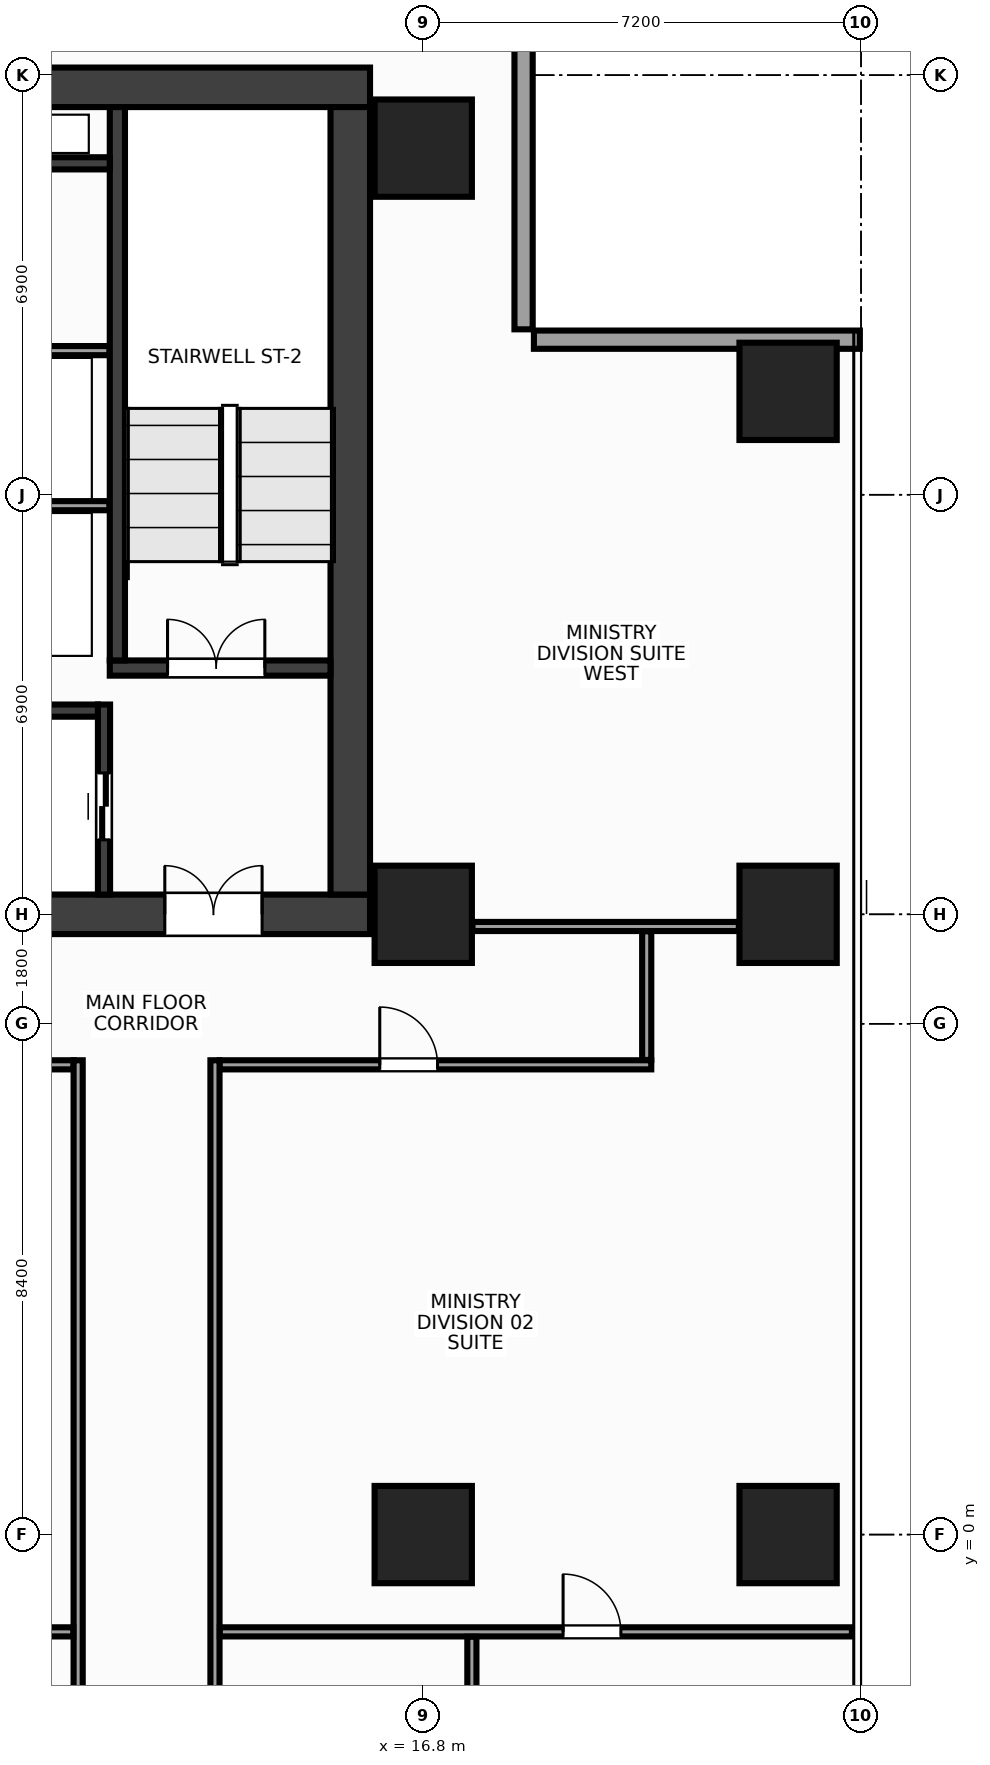
"""IFC4 building model, lengths in metres.
Left out: names, types, materials, properties, quantities, classifications, styles, units other than length and angle.
Written with IfcOpenShell. Run it as: python <this file> out.ifc"""

import sys

from ifc_helpers import new_model, si_unit, direction, frame, frame_2d, origin, origin_2d, place, context, subcontext, project, spatial, rectangle, extrude, source, transform, mapped, element, fill, save


model = new_model("IFC4")
c1 = context("Model", 3, precision=1e-05, world=origin(), true_north=direction((0.0, 1.0)))
c2 = subcontext(c1, "Body", "Model", "MODEL_VIEW")
j1 = project(units=[si_unit("LENGTHUNIT", "METRE"), si_unit("PLANEANGLEUNIT", "RADIAN")], contexts=[c1])
p1 = place(None, origin())
s1 = spatial("IfcSite", under=j1, at=p1, CompositionType="ELEMENT")
p2 = place(p1, origin())
s2 = spatial("IfcBuilding", under=s1, at=p2, CompositionType="ELEMENT")
p3 = place(p2, frame((0.0, 0.0, 153.2)))
s3 = spatial("IfcBuildingStorey", under=s2, at=p3, CompositionType="ELEMENT", Elevation=153.2)
m1 = source(origin(), c2, "Body", "SweptSolid", [
    extrude(rectangle(XDim=31.85, YDim=0.65, at=frame_2d((15.925, 0.0))), origin(), (0.0, 0.0, 1.0), 3.6),
])
p4 = place(p3, frame((-15.925, 23.8, 0.0), z_axis=(0.0, 0.0, 1.0), x_axis=(1.0, 0.0, 0.0)))
e1 = element("IfcWall", 1, at=p4, inside=s3, PredefinedType="SHEAR", context=c2, shape_type="MappedRepresentation", body=[
    mapped(m1, transform((0.0, 0.0, 0.0), x_axis=(1.0, 0.0, 0.0), y_axis=(0.0, 1.0, 0.0), z_axis=(0.0, 0.0, 1.0), scale=1.0)),
])
p5 = place(p3, frame((-15.925, 10.2, 0.0), z_axis=(0.0, 0.0, 1.0), x_axis=(1.0, 0.0, 0.0)))
e2 = element("IfcWall", 2, at=p5, inside=s3, PredefinedType="SHEAR", context=c2, shape_type="MappedRepresentation", body=[
    mapped(m1, transform((0.0, 0.0, 0.0), x_axis=(1.0, 0.0, 0.0), y_axis=(0.0, 1.0, 0.0), z_axis=(0.0, 0.0, 1.0), scale=1.0)),
])
p6 = place(p5, frame((1.775, 0.0, 0.0)))
e3 = element("IfcOpeningElement", 3, at=p6, cuts=e2, PredefinedType="OPENING", context=c2, shape_type="SweptSolid", body=[
    extrude(rectangle(XDim=1.6, YDim=2.15, at=frame_2d((0.8, 1.075))), frame((0.0, 0.337, 0.0), z_axis=(0.0, -1.0, 0.0), x_axis=(1.0, 0.0, 0.0)), (0.0, 0.0, 1.0), 0.674),
])
p7 = place(p5, frame((28.475, 0.0, 0.0)))
e4 = element("IfcOpeningElement", 4, at=p7, cuts=e2, PredefinedType="OPENING", context=c2, shape_type="SweptSolid", body=[
    extrude(rectangle(XDim=1.6, YDim=2.15, at=frame_2d((0.8, 1.075))), frame((0.0, 0.337, 0.0), z_axis=(0.0, -1.0, 0.0), x_axis=(1.0, 0.0, 0.0)), (0.0, 0.0, 1.0), 0.674),
])
p8 = place(p5, frame((15.175, 0.0, 0.0)))
e5 = element("IfcOpeningElement", 5, at=p8, cuts=e2, PredefinedType="OPENING", context=c2, shape_type="SweptSolid", body=[
    extrude(rectangle(XDim=1.5, YDim=2.2, at=frame_2d((0.75, 1.1))), frame((0.0, 0.337, 0.0), z_axis=(0.0, -1.0, 0.0), x_axis=(1.0, 0.0, 0.0)), (0.0, 0.0, 1.0), 0.674),
])
m2 = source(origin(), c2, "Body", "SweptSolid", [
    extrude(rectangle(XDim=12.95, YDim=0.65, at=frame_2d((6.475, 0.0))), origin(), (0.0, 0.0, 1.0), 3.6),
])
p9 = place(p3, frame((15.6, 10.525, 0.0), z_axis=(0.0, 0.0, 1.0), x_axis=(0.0, 1.0, 0.0)))
e6 = element("IfcWall", 6, at=p9, inside=s3, PredefinedType="SHEAR", context=c2, shape_type="MappedRepresentation", body=[
    mapped(m2, transform((0.0, 0.0, 0.0), x_axis=(1.0, 0.0, 0.0), y_axis=(0.0, 1.0, 0.0), z_axis=(0.0, 0.0, 1.0), scale=1.0)),
])
m3 = source(origin(), c2, "Body", "SweptSolid", [
    extrude(rectangle(XDim=3.63, YDim=0.25, at=frame_2d((1.815, 0.0))), origin(), (0.0, 0.0, 1.0), 3.6),
])
p10 = place(p3, frame((11.645, 14.25, 0.0), z_axis=(0.0, 0.0, 1.0), x_axis=(1.0, 0.0, 0.0)))
e7 = element("IfcWall", 7, at=p10, inside=s3, PredefinedType="SHEAR", context=c2, shape_type="MappedRepresentation", body=[
    mapped(m3, transform((0.0, 0.0, 0.0), x_axis=(1.0, 0.0, 0.0), y_axis=(0.0, 1.0, 0.0), z_axis=(0.0, 0.0, 1.0), scale=1.0)),
])
p11 = place(p10, frame((0.95, 0.0, 0.0)))
e8 = element("IfcOpeningElement", 8, at=p11, cuts=e7, PredefinedType="OPENING", context=c2, shape_type="SweptSolid", body=[
    extrude(rectangle(XDim=1.6, YDim=2.15, at=frame_2d((0.8, 1.075))), frame((0.0, 0.137, 0.0), z_axis=(0.0, -1.0, 0.0), x_axis=(1.0, 0.0, 0.0)), (0.0, 0.0, 1.0), 0.274),
])
m4 = source(origin(), c2, "Body", "SweptSolid", [
    extrude(rectangle(XDim=9.1, YDim=0.25, at=frame_2d((4.55, 0.0))), origin(), (0.0, 0.0, 1.0), 3.6),
])
p12 = place(p3, frame((11.77, 14.375, 0.0), z_axis=(0.0, 0.0, 1.0), x_axis=(0.0, 1.0, 0.0)))
e9 = element("IfcWall", 9, at=p12, inside=s3, PredefinedType="SHEAR", context=c2, shape_type="MappedRepresentation", body=[
    mapped(m4, transform((0.0, 0.0, 0.0), x_axis=(1.0, 0.0, 0.0), y_axis=(0.0, 1.0, 0.0), z_axis=(0.0, 0.0, 1.0), scale=1.0)),
])
m5 = source(origin(), c2, "Body", "SweptSolid", [
    extrude(rectangle(XDim=3.125, YDim=0.2, at=frame_2d((1.562, 0.0))), origin(), (0.0, 0.0, 1.0), 3.6),
])
p13 = place(p3, frame((11.55, 10.525, 0.0), z_axis=(0.0, 0.0, 1.0), x_axis=(0.0, 1.0, 0.0)))
e10 = element("IfcWall", 10, at=p13, inside=s3, PredefinedType="SHEAR", context=c2, shape_type="MappedRepresentation", body=[
    mapped(m5, transform((0.0, 0.0, 0.0), x_axis=(1.0, 0.0, 0.0), y_axis=(0.0, 1.0, 0.0), z_axis=(0.0, 0.0, 1.0), scale=1.0)),
])
p14 = place(p13, frame((0.9, 0.0, 0.0)))
e11 = element("IfcOpeningElement", 11, at=p14, cuts=e10, PredefinedType="OPENING", context=c2, shape_type="SweptSolid", body=[
    extrude(rectangle(XDim=1.1, YDim=2.15, at=frame_2d((0.55, 1.075))), frame((0.0, 0.112, 0.0), z_axis=(0.0, -1.0, 0.0), x_axis=(1.0, 0.0, 0.0)), (0.0, 0.0, 1.0), 0.224),
])
m6 = source(origin(), c2, "Body", "SweptSolid", [
    extrude(rectangle(XDim=2.825, YDim=0.2, at=frame_2d((1.413, 0.0))), origin(), (0.0, 0.0, 1.0), 3.6),
])
p15 = place(p3, frame((8.625, 13.55, 0.0), z_axis=(0.0, 0.0, 1.0), x_axis=(1.0, 0.0, 0.0)))
e12 = element("IfcWall", 12, at=p15, inside=s3, PredefinedType="SHEAR", context=c2, shape_type="MappedRepresentation", body=[
    mapped(m6, transform((0.0, 0.0, 0.0), x_axis=(1.0, 0.0, 0.0), y_axis=(0.0, 1.0, 0.0), z_axis=(0.0, 0.0, 1.0), scale=1.0)),
])
m7 = source(origin(), c2, "Body", "SweptSolid", [
    extrude(rectangle(XDim=3.02, YDim=0.2, at=frame_2d((1.51, 0.0))), origin(), (0.0, 0.0, 1.0), 3.6),
])
p16 = place(p3, frame((8.625, 22.55, 0.0), z_axis=(0.0, 0.0, 1.0), x_axis=(1.0, 0.0, 0.0)))
e13 = element("IfcWall", 13, at=p16, inside=s3, PredefinedType="SHEAR", context=c2, shape_type="MappedRepresentation", body=[
    mapped(m7, transform((0.0, 0.0, 0.0), x_axis=(1.0, 0.0, 0.0), y_axis=(0.0, 1.0, 0.0), z_axis=(0.0, 0.0, 1.0), scale=1.0)),
])
m8 = source(origin(), c2, "Body", "SweptSolid", [
    extrude(rectangle(XDim=1.6, YDim=1.6, at=origin_2d()), origin(), (0.0, 0.0, 1.0), 3.6),
])
for number, where, z_axis, x_axis in (
    (14, (16.8, 0.0, 0.0), (0.0, 0.0, 1.0), (1.0, 0.0, 0.0)),
    (15, (16.8, 10.2, 0.0), (0.0, 0.0, 1.0), (1.0, 0.0, 0.0)),
    (16, (16.8, 22.8, 0.0), (0.0, 0.0, 1.0), (1.0, 0.0, 0.0)),
    (17, (22.8, 0.0, 0.0), (0.0, 0.0, 1.0), (1.0, 0.0, 0.0)),
    (18, (22.8, 10.2, 0.0), (0.0, 0.0, 1.0), (1.0, 0.0, 0.0)),
    (19, (22.8, 18.8, 0.0), (0.0, 0.0, 1.0), (1.0, 0.0, 0.0)),
):
    element("IfcColumn", number, at=place(p3, frame(where, z_axis=z_axis, x_axis=x_axis)), inside=s3, PredefinedType="COLUMN", context=c2, shape_type="MappedRepresentation", body=[
        mapped(m8, transform((0.0, 0.0, 0.0), x_axis=(1.0, 0.0, 0.0), y_axis=(0.0, 1.0, 0.0), z_axis=(0.0, 0.0, 1.0), scale=1.0)),
    ])
m9 = source(origin(), c2, "Body", "SweptSolid", [
    extrude(rectangle(XDim=5.36, YDim=0.3, at=frame_2d((2.68, 0.0))), origin(), (0.0, 0.0, 1.0), 2.76),
])
for number, where, z_axis, x_axis in (
    (20, (23.98, 19.65, 0.0), (0.0, 0.0, 1.0), (-1.0, 0.0, 0.0)),
    (21, (18.45, 19.82, 0.0), (0.0, 0.0, 1.0), (0.0, 1.0, 0.0)),
):
    element("IfcWall", number, at=place(p3, frame(where, z_axis=z_axis, x_axis=x_axis)), inside=s3, PredefinedType="STANDARD", context=c2, shape_type="MappedRepresentation", body=[
        mapped(m9, transform((0.0, 0.0, 0.0), x_axis=(1.0, 0.0, 0.0), y_axis=(0.0, 1.0, 0.0), z_axis=(0.0, 0.0, 1.0), scale=1.0)),
    ])
m10 = source(origin(), c2, "Body", "SweptSolid", [
    extrude(rectangle(XDim=3.01, YDim=0.15, at=frame_2d((1.505, 0.0))), origin(), (0.0, 0.0, 1.0), 3.38),
])
for number, where, z_axis, x_axis in (
    (22, (8.63, 16.92, 0.0), (0.0, 0.0, 1.0), (1.0, 0.0, 0.0)),
    (23, (8.63, 19.47, 0.0), (0.0, 0.0, 1.0), (1.0, 0.0, 0.0)),
):
    element("IfcWall", number, at=place(p3, frame(where, z_axis=z_axis, x_axis=x_axis)), inside=s3, PredefinedType="PARTITIONING", context=c2, shape_type="MappedRepresentation", body=[
        mapped(m10, transform((0.0, 0.0, 0.0), x_axis=(1.0, 0.0, 0.0), y_axis=(0.0, 1.0, 0.0), z_axis=(0.0, 0.0, 1.0), scale=1.0)),
    ])
m11 = source(origin(), c2, "Body", "SweptSolid", [
    extrude(rectangle(XDim=4.38, YDim=0.15, at=frame_2d((2.19, 0.0))), origin(), (0.0, 0.0, 1.0), 2.915),
])
p17 = place(p3, frame((17.61, 10.0, 0.0), z_axis=(0.0, 0.0, 1.0), x_axis=(1.0, 0.0, 0.0)))
e24 = element("IfcWall", 24, at=p17, inside=s3, PredefinedType="PARTITIONING", context=c2, shape_type="MappedRepresentation", body=[
    mapped(m11, transform((0.0, 0.0, 0.0), x_axis=(1.0, 0.0, 0.0), y_axis=(0.0, 1.0, 0.0), z_axis=(0.0, 0.0, 1.0), scale=1.0)),
])
m12 = source(origin(), c2, "Body", "SweptSolid", [
    extrude(rectangle(XDim=31.6, YDim=0.15, at=frame_2d((15.8, 0.0))), origin(), (0.0, 0.0, 1.0), 2.765),
])
p18 = place(p3, frame((-20.55, 7.725, 0.0), z_axis=(0.0, 0.0, 1.0), x_axis=(1.0, 0.0, 0.0)))
e25 = element("IfcWall", 25, at=p18, inside=s3, PredefinedType="PARTITIONING", context=c2, shape_type="MappedRepresentation", body=[
    mapped(m12, transform((0.0, 0.0, 0.0), x_axis=(1.0, 0.0, 0.0), y_axis=(0.0, 1.0, 0.0), z_axis=(0.0, 0.0, 1.0), scale=1.0)),
])
p19 = place(p18, frame((0.722, 0.0, 0.0)))
e26 = element("IfcOpeningElement", 26, at=p19, cuts=e25, PredefinedType="OPENING", context=c2, shape_type="SweptSolid", body=[
    extrude(rectangle(XDim=0.95, YDim=2.15, at=frame_2d((0.475, 1.075))), frame((0.0, 0.087, 0.0), z_axis=(0.0, -1.0, 0.0), x_axis=(1.0, 0.0, 0.0)), (0.0, 0.0, 1.0), 0.174),
])
p20 = place(p18, frame((6.075, 0.0, 0.0)))
e27 = element("IfcOpeningElement", 27, at=p20, cuts=e25, PredefinedType="OPENING", context=c2, shape_type="SweptSolid", body=[
    extrude(rectangle(XDim=0.95, YDim=2.15, at=frame_2d((0.475, 1.075))), frame((0.0, 0.087, 0.0), z_axis=(0.0, -1.0, 0.0), x_axis=(1.0, 0.0, 0.0)), (0.0, 0.0, 1.0), 0.174),
])
p21 = place(p18, frame((15.875, 0.0, 0.0)))
e28 = element("IfcOpeningElement", 28, at=p21, cuts=e25, PredefinedType="OPENING", context=c2, shape_type="SweptSolid", body=[
    extrude(rectangle(XDim=0.95, YDim=2.15, at=frame_2d((0.475, 1.075))), frame((0.0, 0.087, 0.0), z_axis=(0.0, -1.0, 0.0), x_axis=(1.0, 0.0, 0.0)), (0.0, 0.0, 1.0), 0.174),
])
p22 = place(p18, frame((26.278, 0.0, 0.0)))
e29 = element("IfcOpeningElement", 29, at=p22, cuts=e25, PredefinedType="OPENING", context=c2, shape_type="SweptSolid", body=[
    extrude(rectangle(XDim=0.95, YDim=2.15, at=frame_2d((0.475, 1.075))), frame((0.0, 0.087, 0.0), z_axis=(0.0, -1.0, 0.0), x_axis=(1.0, 0.0, 0.0)), (0.0, 0.0, 1.0), 0.174),
])
m13 = source(origin(), c2, "Body", "SweptSolid", [
    extrude(rectangle(XDim=7.1, YDim=0.15, at=frame_2d((3.55, 0.0))), origin(), (0.0, 0.0, 1.0), 2.765),
])
p23 = place(p3, frame((13.45, 7.725, 0.0), z_axis=(0.0, 0.0, 1.0), x_axis=(1.0, 0.0, 0.0)))
e30 = element("IfcWall", 30, at=p23, inside=s3, PredefinedType="PARTITIONING", context=c2, shape_type="MappedRepresentation", body=[
    mapped(m13, transform((0.0, 0.0, 0.0), x_axis=(1.0, 0.0, 0.0), y_axis=(0.0, 1.0, 0.0), z_axis=(0.0, 0.0, 1.0), scale=1.0)),
])
p24 = place(p23, frame((2.635, 0.0, 0.0)))
e31 = element("IfcOpeningElement", 31, at=p24, cuts=e30, PredefinedType="OPENING", context=c2, shape_type="SweptSolid", body=[
    extrude(rectangle(XDim=0.95, YDim=2.15, at=frame_2d((0.475, 1.075))), frame((0.0, 0.087, 0.0), z_axis=(0.0, -1.0, 0.0), x_axis=(1.0, 0.0, 0.0)), (0.0, 0.0, 1.0), 0.174),
])
m14 = source(origin(), c2, "Body", "SweptSolid", [
    extrude(rectangle(XDim=2.115, YDim=0.15, at=frame_2d((1.058, 0.0))), origin(), (0.0, 0.0, 1.0), 3.38),
])
p25 = place(p3, frame((20.475, 7.805, 0.0), z_axis=(0.0, 0.0, 1.0), x_axis=(0.0, 1.0, 0.0)))
e32 = element("IfcWall", 32, at=p25, inside=s3, PredefinedType="PARTITIONING", context=c2, shape_type="MappedRepresentation", body=[
    mapped(m14, transform((0.0, 0.0, 0.0), x_axis=(1.0, 0.0, 0.0), y_axis=(0.0, 1.0, 0.0), z_axis=(0.0, 0.0, 1.0), scale=1.0)),
])
m15 = source(origin(), c2, "Body", "SweptSolid", [
    extrude(rectangle(XDim=22.595, YDim=0.15, at=frame_2d((11.297, 0.0))), origin(), (0.0, 0.0, 1.0), 2.665),
])
for number, where, z_axis, x_axis in (
    (33, (11.125, -14.795, 0.0), (0.0, 0.0, 1.0), (0.0, 1.0, 0.0)),
    (34, (13.375, -14.795, 0.0), (0.0, 0.0, 1.0), (0.0, 1.0, 0.0)),
):
    element("IfcWall", number, at=place(p3, frame(where, z_axis=z_axis, x_axis=x_axis)), inside=s3, PredefinedType="PARTITIONING", context=c2, shape_type="MappedRepresentation", body=[
        mapped(m15, transform((0.0, 0.0, 0.0), x_axis=(1.0, 0.0, 0.0), y_axis=(0.0, 1.0, 0.0), z_axis=(0.0, 0.0, 1.0), scale=1.0)),
    ])
m16 = source(origin(), c2, "Body", "SweptSolid", [
    extrude(rectangle(XDim=34.895, YDim=0.15, at=frame_2d((17.448, 0.0))), origin(), (0.0, 0.0, 1.0), 2.765),
])
p26 = place(p3, frame((-23.85, -1.6, 0.0), z_axis=(0.0, 0.0, 1.0), x_axis=(1.0, 0.0, 0.0)))
e35 = element("IfcWall", 35, at=p26, inside=s3, PredefinedType="PARTITIONING", context=c2, shape_type="MappedRepresentation", body=[
    mapped(m16, transform((0.0, 0.0, 0.0), x_axis=(1.0, 0.0, 0.0), y_axis=(0.0, 1.0, 0.0), z_axis=(0.0, 0.0, 1.0), scale=1.0)),
])
p27 = place(p26, frame((3.913, 0.0, 0.0)))
e36 = element("IfcOpeningElement", 36, at=p27, cuts=e35, PredefinedType="OPENING", context=c2, shape_type="SweptSolid", body=[
    extrude(rectangle(XDim=0.95, YDim=2.15, at=frame_2d((0.475, 1.075))), frame((0.0, 0.087, 0.0), z_axis=(0.0, -1.0, 0.0), x_axis=(1.0, 0.0, 0.0)), (0.0, 0.0, 1.0), 0.174),
])
p28 = place(p26, frame((9.675, 0.0, 0.0)))
e37 = element("IfcOpeningElement", 37, at=p28, cuts=e35, PredefinedType="OPENING", context=c2, shape_type="SweptSolid", body=[
    extrude(rectangle(XDim=0.95, YDim=2.15, at=frame_2d((0.475, 1.075))), frame((0.0, 0.087, 0.0), z_axis=(0.0, -1.0, 0.0), x_axis=(1.0, 0.0, 0.0)), (0.0, 0.0, 1.0), 0.174),
])
p29 = place(p26, frame((19.175, 0.0, 0.0)))
e38 = element("IfcOpeningElement", 38, at=p29, cuts=e35, PredefinedType="OPENING", context=c2, shape_type="SweptSolid", body=[
    extrude(rectangle(XDim=0.95, YDim=2.15, at=frame_2d((0.475, 1.075))), frame((0.0, 0.087, 0.0), z_axis=(0.0, -1.0, 0.0), x_axis=(1.0, 0.0, 0.0)), (0.0, 0.0, 1.0), 0.174),
])
p30 = place(p26, frame((28.275, 0.0, 0.0)))
e39 = element("IfcOpeningElement", 39, at=p30, cuts=e35, PredefinedType="OPENING", context=c2, shape_type="SweptSolid", body=[
    extrude(rectangle(XDim=0.95, YDim=2.15, at=frame_2d((0.475, 1.075))), frame((0.0, 0.087, 0.0), z_axis=(0.0, -1.0, 0.0), x_axis=(1.0, 0.0, 0.0)), (0.0, 0.0, 1.0), 0.174),
])
m17 = source(origin(), c2, "Body", "SweptSolid", [
    extrude(rectangle(XDim=10.395, YDim=0.15, at=frame_2d((5.198, 0.0))), origin(), (0.0, 0.0, 1.0), 2.765),
])
p31 = place(p3, frame((13.455, -1.6, 0.0), z_axis=(0.0, 0.0, 1.0), x_axis=(1.0, 0.0, 0.0)))
e40 = element("IfcWall", 40, at=p31, inside=s3, PredefinedType="PARTITIONING", context=c2, shape_type="MappedRepresentation", body=[
    mapped(m17, transform((0.0, 0.0, 0.0), x_axis=(1.0, 0.0, 0.0), y_axis=(0.0, 1.0, 0.0), z_axis=(0.0, 0.0, 1.0), scale=1.0)),
])
p32 = place(p31, frame((5.645, 0.0, 0.0)))
e41 = element("IfcOpeningElement", 41, at=p32, cuts=e40, PredefinedType="OPENING", context=c2, shape_type="SweptSolid", body=[
    extrude(rectangle(XDim=0.95, YDim=2.15, at=frame_2d((0.475, 1.075))), frame((0.0, 0.087, 0.0), z_axis=(0.0, -1.0, 0.0), x_axis=(1.0, 0.0, 0.0)), (0.0, 0.0, 1.0), 0.174),
])
m18 = source(origin(), c2, "Body", "SweptSolid", [
    extrude(rectangle(XDim=8.31, YDim=0.15, at=frame_2d((4.155, 0.0))), origin(), (0.0, 0.0, 1.0), 3.38),
])
p33 = place(p3, frame((17.6, -9.99, 0.0), z_axis=(0.0, 0.0, 1.0), x_axis=(0.0, 1.0, 0.0)))
e42 = element("IfcWall", 42, at=p33, inside=s3, PredefinedType="PARTITIONING", context=c2, shape_type="MappedRepresentation", body=[
    mapped(m18, transform((0.0, 0.0, 0.0), x_axis=(1.0, 0.0, 0.0), y_axis=(0.0, 1.0, 0.0), z_axis=(0.0, 0.0, 1.0), scale=1.0)),
])
m19 = source(origin(), c2, "Body", "SweptSolid", [
    extrude(rectangle(XDim=1.6, YDim=2.15, at=frame_2d((0.8, 1.075))), frame((0.0, 0.025, 0.0), z_axis=(0.0, -1.0, 0.0), x_axis=(1.0, 0.0, 0.0)), (0.0, 0.0, 1.0), 0.05),
])
p34 = place(p11, origin())
e43 = element("IfcDoor", 43, at=p34, inside=s3, OperationType="DOUBLE_DOOR_SINGLE_SWING", PredefinedType="DOOR", context=c2, shape_type="MappedRepresentation", body=[
    mapped(m19, transform((0.0, 0.0, 0.0), x_axis=(1.0, 0.0, 0.0), y_axis=(0.0, 1.0, 0.0), z_axis=(0.0, 0.0, 1.0), scale=1.0)),
])
fill(e8, e43)
p35 = place(p7, origin())
e44 = element("IfcDoor", 44, at=p35, inside=s3, OperationType="DOUBLE_DOOR_SINGLE_SWING", PredefinedType="DOOR", context=c2, shape_type="MappedRepresentation", body=[
    mapped(m19, transform((0.0, 0.0, 0.0), x_axis=(1.0, 0.0, 0.0), y_axis=(0.0, 1.0, 0.0), z_axis=(0.0, 0.0, 1.0), scale=1.0)),
])
fill(e4, e44)
m20 = source(origin(), c2, "Body", "SweptSolid", [
    extrude(rectangle(XDim=1.1, YDim=2.15, at=frame_2d((0.55, 1.075))), frame((0.0, 0.025, 0.0), z_axis=(0.0, -1.0, 0.0), x_axis=(1.0, 0.0, 0.0)), (0.0, 0.0, 1.0), 0.05),
])
p36 = place(p14, origin())
e45 = element("IfcDoor", 45, at=p36, inside=s3, OperationType="DOUBLE_DOOR_SLIDING", PredefinedType="DOOR", context=c2, shape_type="MappedRepresentation", body=[
    mapped(m20, transform((0.0, 0.0, 0.0), x_axis=(1.0, 0.0, 0.0), y_axis=(0.0, 1.0, 0.0), z_axis=(0.0, 0.0, 1.0), scale=1.0)),
])
fill(e11, e45)
m21 = source(origin(), c2, "Body", "SweptSolid", [
    extrude(rectangle(XDim=0.95, YDim=2.15, at=frame_2d((0.475, 1.075))), frame((0.0, 0.025, 0.0), z_axis=(0.0, -1.0, 0.0), x_axis=(1.0, 0.0, 0.0)), (0.0, 0.0, 1.0), 0.05),
])
p37 = place(p24, origin())
e46 = element("IfcDoor", 46, at=p37, inside=s3, OperationType="SINGLE_SWING_LEFT", PredefinedType="DOOR", context=c2, shape_type="MappedRepresentation", body=[
    mapped(m21, transform((0.0, 0.0, 0.0), x_axis=(1.0, 0.0, 0.0), y_axis=(0.0, 1.0, 0.0), z_axis=(0.0, 0.0, 1.0), scale=1.0)),
])
fill(e31, e46)
p38 = place(p32, origin())
e47 = element("IfcDoor", 47, at=p38, inside=s3, OperationType="SINGLE_SWING_LEFT", PredefinedType="DOOR", context=c2, shape_type="MappedRepresentation", body=[
    mapped(m21, transform((0.0, 0.0, 0.0), x_axis=(1.0, 0.0, 0.0), y_axis=(0.0, 1.0, 0.0), z_axis=(0.0, 0.0, 1.0), scale=1.0)),
])
fill(e41, e47)
save(model, sys.argv[1])
